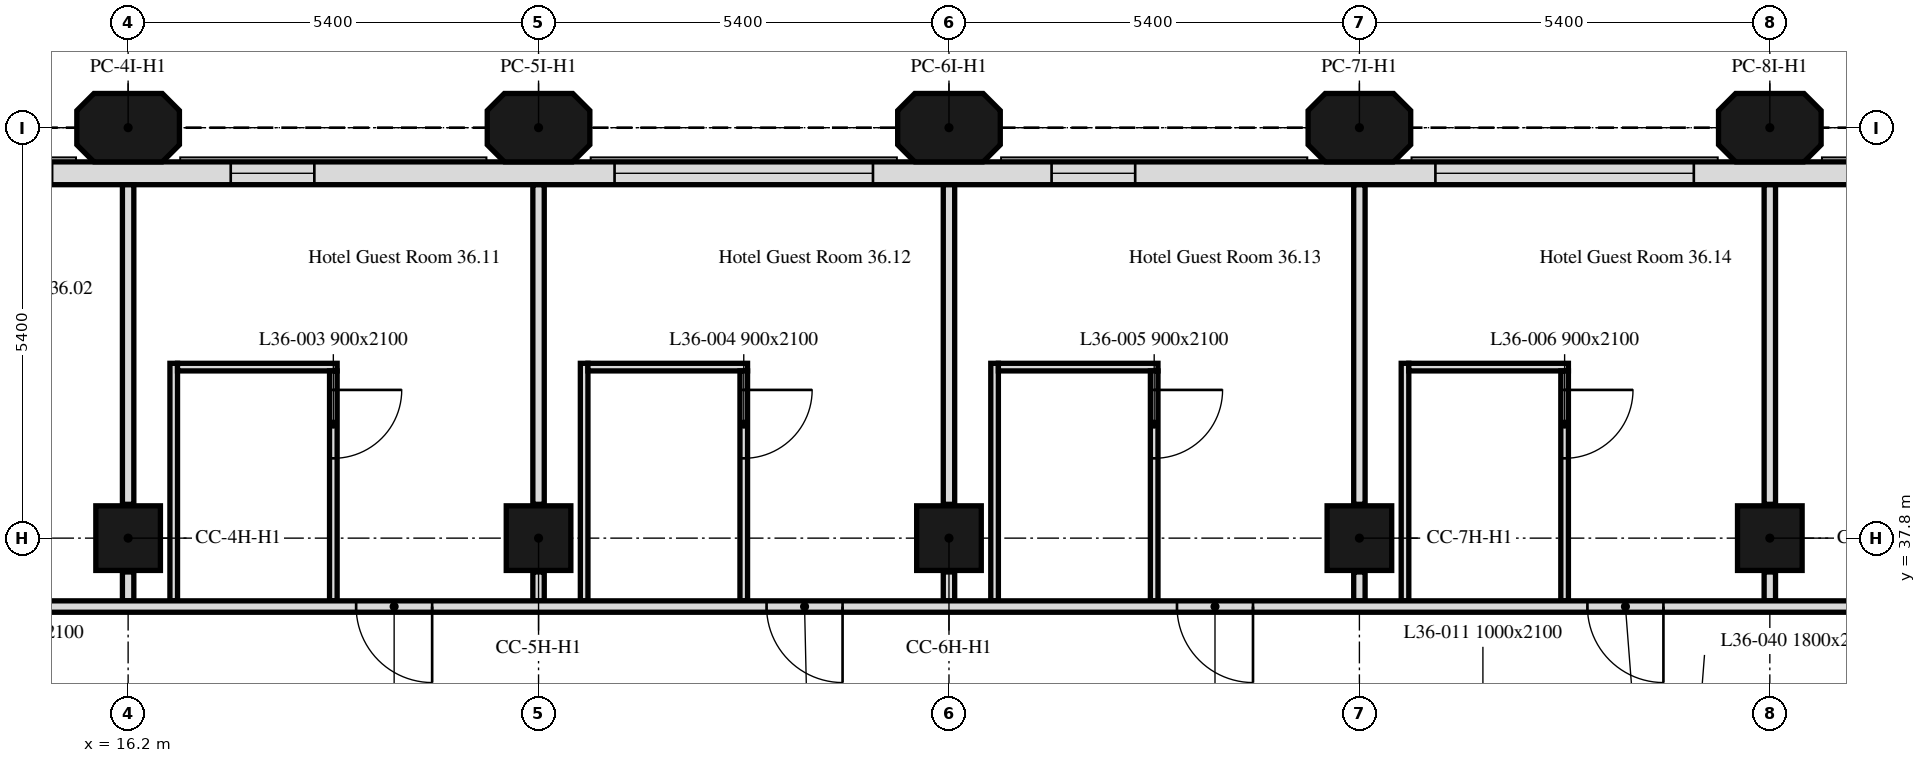
"""IFC4 building model, lengths in metres.
Left out: names, types, materials, properties, quantities, classifications, styles, units other than length and angle.
Written with IfcOpenShell. Run it as: python <this file> out.ifc"""

import sys

from ifc_helpers import new_model, si_unit, direction, frame, frame_2d, origin, origin_2d, place, context, subcontext, project, spatial, polyline, rectangle, outline, extrude, element, fill, save


model = new_model("IFC4")
c1 = context("Model", 3, precision=1e-05, world=origin(), true_north=direction((0.0, 1.0)))
c2 = subcontext(c1, "Body", "Model", "MODEL_VIEW")
j1 = project(units=[si_unit("LENGTHUNIT", "METRE"), si_unit("PLANEANGLEUNIT", "RADIAN")], contexts=[c1])
p1 = place(None, origin())
s1 = spatial("IfcSite", under=j1, at=p1, CompositionType="ELEMENT")
p2 = place(p1, origin())
s2 = spatial("IfcBuilding", under=s1, at=p2, CompositionType="ELEMENT")
p3 = place(p2, frame((0.0, 0.0, 156.1)))
s3 = spatial("IfcBuildingStorey", under=s2, at=p3, CompositionType="ELEMENT", Elevation=156.1)
for number, where, z_axis, x_axis in (
    (1, (16.2, 37.8, 0.0), (0.0, 0.0, 1.0), (1.0, 0.0, 0.0)),
    (2, (21.6, 37.8, 0.0), (0.0, 0.0, 1.0), (1.0, 0.0, 0.0)),
    (3, (27.0, 37.8, 0.0), (0.0, 0.0, 1.0), (1.0, 0.0, 0.0)),
    (4, (32.4, 37.8, 0.0), (0.0, 0.0, 1.0), (1.0, 0.0, 0.0)),
    (5, (37.8, 37.8, 0.0), (0.0, 0.0, 1.0), (1.0, 0.0, 0.0)),
):
    element("IfcColumn", number, at=place(p3, frame(where, z_axis=z_axis, x_axis=x_axis)), inside=s3, PredefinedType="COLUMN", context=c2, shape_type="SweptSolid", body=[
        extrude(rectangle(XDim=0.85, YDim=0.85, at=origin_2d()), origin(), (0.0, 0.0, 1.0), 3.0),
    ])
for number, where, z_axis, x_axis in (
    (6, (16.2, 43.2, 0.0), (0.0, 0.0, 1.0), (1.0, 0.0, 0.0)),
    (7, (21.6, 43.2, 0.0), (0.0, 0.0, 1.0), (1.0, 0.0, 0.0)),
    (8, (27.0, 43.2, 0.0), (0.0, 0.0, 1.0), (1.0, 0.0, 0.0)),
    (9, (32.4, 43.2, 0.0), (0.0, 0.0, 1.0), (1.0, 0.0, 0.0)),
    (10, (37.8, 43.2, 0.0), (0.0, 0.0, 1.0), (1.0, 0.0, 0.0)),
):
    element("IfcColumn", number, at=place(p3, frame(where, z_axis=z_axis, x_axis=x_axis)), inside=s3, PredefinedType="COLUMN", context=c2, shape_type="SweptSolid", body=[
        extrude(outline(polyline([(-0.45, -0.45), (0.45, -0.45), (0.675, -0.225), (0.675, 0.225), (0.45, 0.45), (-0.45, 0.45), (-0.675, 0.225), (-0.675, -0.225), (-0.45, -0.45)])), origin(), (0.0, 0.0, 1.0), 3.0),
    ])
p4 = place(p3, frame((43.014, 42.6, 0.0), z_axis=(0.0, 0.0, 1.0), x_axis=(-1.0, 0.0, 0.0)))
e11 = element("IfcWall", 11, at=p4, inside=s3, PredefinedType="SOLIDWALL", context=c2, shape_type="SweptSolid", body=[
    extrude(rectangle(XDim=32.027, YDim=0.3, at=frame_2d((16.014, 0.0))), origin(), (0.0, 0.0, 1.0), 3.0),
])
p5 = place(p4, frame((2.764, 0.0, 0.9)))
e12 = element("IfcOpeningElement", 12, at=p5, cuts=e11, PredefinedType="OPENING", context=c2, shape_type="SweptSolid", body=[
    extrude(rectangle(XDim=1.1, YDim=1.7, at=frame_2d((0.55, 0.85))), frame((0.0, 0.16, 0.0), z_axis=(0.0, -1.0, 0.0), x_axis=(1.0, 0.0, 0.0)), (0.0, 0.0, 1.0), 0.32),
])
p6 = place(p4, frame((6.214, 0.0, 0.9)))
e13 = element("IfcOpeningElement", 13, at=p6, cuts=e11, PredefinedType="OPENING", context=c2, shape_type="SweptSolid", body=[
    extrude(rectangle(XDim=3.4, YDim=1.7, at=frame_2d((1.7, 0.85))), frame((0.0, 0.16, 0.0), z_axis=(0.0, -1.0, 0.0), x_axis=(1.0, 0.0, 0.0)), (0.0, 0.0, 1.0), 0.32),
])
p7 = place(p4, frame((13.564, 0.0, 0.9)))
e14 = element("IfcOpeningElement", 14, at=p7, cuts=e11, PredefinedType="OPENING", context=c2, shape_type="SweptSolid", body=[
    extrude(rectangle(XDim=1.1, YDim=1.7, at=frame_2d((0.55, 0.85))), frame((0.0, 0.16, 0.0), z_axis=(0.0, -1.0, 0.0), x_axis=(1.0, 0.0, 0.0)), (0.0, 0.0, 1.0), 0.32),
])
p8 = place(p4, frame((17.014, 0.0, 0.9)))
e15 = element("IfcOpeningElement", 15, at=p8, cuts=e11, PredefinedType="OPENING", context=c2, shape_type="SweptSolid", body=[
    extrude(rectangle(XDim=3.4, YDim=1.7, at=frame_2d((1.7, 0.85))), frame((0.0, 0.16, 0.0), z_axis=(0.0, -1.0, 0.0), x_axis=(1.0, 0.0, 0.0)), (0.0, 0.0, 1.0), 0.32),
])
p9 = place(p4, frame((24.364, 0.0, 0.9)))
e16 = element("IfcOpeningElement", 16, at=p9, cuts=e11, PredefinedType="OPENING", context=c2, shape_type="SweptSolid", body=[
    extrude(rectangle(XDim=1.1, YDim=1.7, at=frame_2d((0.55, 0.85))), frame((0.0, 0.16, 0.0), z_axis=(0.0, -1.0, 0.0), x_axis=(1.0, 0.0, 0.0)), (0.0, 0.0, 1.0), 0.32),
])
p10 = place(p4, frame((27.814, 0.0, 0.9)))
e17 = element("IfcOpeningElement", 17, at=p10, cuts=e11, PredefinedType="OPENING", context=c2, shape_type="SweptSolid", body=[
    extrude(rectangle(XDim=3.4, YDim=1.7, at=frame_2d((1.7, 0.85))), frame((0.0, 0.16, 0.0), z_axis=(0.0, -1.0, 0.0), x_axis=(1.0, 0.0, 0.0)), (0.0, 0.0, 1.0), 0.32),
])
p11 = place(p3, frame((16.2, 36.975, 0.0), z_axis=(0.0, 0.0, 1.0), x_axis=(0.0, 1.0, 0.0)))
e18 = element("IfcWall", 18, at=p11, inside=s3, PredefinedType="PARTITIONING", context=c2, shape_type="SweptSolid", body=[
    extrude(rectangle(XDim=0.38, YDim=0.15, at=frame_2d((0.19, 0.0))), origin(), (0.0, 0.0, 1.0), 3.0),
])
p12 = place(p3, frame((16.2, 38.245, 0.0), z_axis=(0.0, 0.0, 1.0), x_axis=(0.0, 1.0, 0.0)))
e19 = element("IfcWall", 19, at=p12, inside=s3, PredefinedType="PARTITIONING", context=c2, shape_type="SweptSolid", body=[
    extrude(rectangle(XDim=4.204, YDim=0.15, at=frame_2d((2.102, 0.0))), origin(), (0.0, 0.0, 1.0), 3.0),
])
p13 = place(p3, frame((16.8, 36.975, 0.0), z_axis=(0.0, 0.0, 1.0), x_axis=(0.0, 1.0, 0.0)))
e20 = element("IfcWall", 20, at=p13, inside=s3, PredefinedType="PARTITIONING", context=c2, shape_type="SweptSolid", body=[
    extrude(rectangle(XDim=3.125, YDim=0.1, at=frame_2d((1.562, 0.0))), origin(), (0.0, 0.0, 1.0), 3.0),
])
p14 = place(p3, frame((16.85, 40.05, 0.0), z_axis=(0.0, 0.0, 1.0), x_axis=(1.0, 0.0, 0.0)))
e21 = element("IfcWall", 21, at=p14, inside=s3, PredefinedType="PARTITIONING", context=c2, shape_type="SweptSolid", body=[
    extrude(rectangle(XDim=2.1, YDim=0.1, at=frame_2d((1.05, 0.0))), origin(), (0.0, 0.0, 1.0), 3.0),
])
p15 = place(p3, frame((18.9, 40.0, 0.0), z_axis=(0.0, 0.0, 1.0), x_axis=(0.0, -1.0, 0.0)))
e22 = element("IfcWall", 22, at=p15, inside=s3, PredefinedType="PARTITIONING", context=c2, shape_type="SweptSolid", body=[
    extrude(rectangle(XDim=3.025, YDim=0.1, at=frame_2d((1.512, 0.0))), origin(), (0.0, 0.0, 1.0), 3.0),
])
p16 = place(p15, frame((0.25, 0.0, 0.0)))
e23 = element("IfcOpeningElement", 23, at=p16, cuts=e22, PredefinedType="OPENING", context=c2, shape_type="SweptSolid", body=[
    extrude(rectangle(XDim=0.9, YDim=2.1, at=frame_2d((0.45, 1.05))), frame((0.0, 0.05, 0.0), z_axis=(0.0, -1.0, 0.0), x_axis=(1.0, 0.0, 0.0)), (0.0, 0.0, 1.0), 0.1),
])
p17 = place(p3, frame((21.6, 36.975, 0.0), z_axis=(0.0, 0.0, 1.0), x_axis=(0.0, 1.0, 0.0)))
e24 = element("IfcWall", 24, at=p17, inside=s3, PredefinedType="PARTITIONING", context=c2, shape_type="SweptSolid", body=[
    extrude(rectangle(XDim=0.38, YDim=0.15, at=frame_2d((0.19, 0.0))), origin(), (0.0, 0.0, 1.0), 3.0),
])
p18 = place(p3, frame((21.6, 38.245, 0.0), z_axis=(0.0, 0.0, 1.0), x_axis=(0.0, 1.0, 0.0)))
e25 = element("IfcWall", 25, at=p18, inside=s3, PredefinedType="PARTITIONING", context=c2, shape_type="SweptSolid", body=[
    extrude(rectangle(XDim=4.204, YDim=0.15, at=frame_2d((2.102, 0.0))), origin(), (0.0, 0.0, 1.0), 3.0),
])
p19 = place(p3, frame((22.2, 36.975, 0.0), z_axis=(0.0, 0.0, 1.0), x_axis=(0.0, 1.0, 0.0)))
e26 = element("IfcWall", 26, at=p19, inside=s3, PredefinedType="PARTITIONING", context=c2, shape_type="SweptSolid", body=[
    extrude(rectangle(XDim=3.125, YDim=0.1, at=frame_2d((1.562, 0.0))), origin(), (0.0, 0.0, 1.0), 3.0),
])
p20 = place(p3, frame((22.25, 40.05, 0.0), z_axis=(0.0, 0.0, 1.0), x_axis=(1.0, 0.0, 0.0)))
e27 = element("IfcWall", 27, at=p20, inside=s3, PredefinedType="PARTITIONING", context=c2, shape_type="SweptSolid", body=[
    extrude(rectangle(XDim=2.1, YDim=0.1, at=frame_2d((1.05, 0.0))), origin(), (0.0, 0.0, 1.0), 3.0),
])
p21 = place(p3, frame((24.3, 40.0, 0.0), z_axis=(0.0, 0.0, 1.0), x_axis=(0.0, -1.0, 0.0)))
e28 = element("IfcWall", 28, at=p21, inside=s3, PredefinedType="PARTITIONING", context=c2, shape_type="SweptSolid", body=[
    extrude(rectangle(XDim=3.025, YDim=0.1, at=frame_2d((1.512, 0.0))), origin(), (0.0, 0.0, 1.0), 3.0),
])
p22 = place(p21, frame((0.25, 0.0, 0.0)))
e29 = element("IfcOpeningElement", 29, at=p22, cuts=e28, PredefinedType="OPENING", context=c2, shape_type="SweptSolid", body=[
    extrude(rectangle(XDim=0.9, YDim=2.1, at=frame_2d((0.45, 1.05))), frame((0.0, 0.05, 0.0), z_axis=(0.0, -1.0, 0.0), x_axis=(1.0, 0.0, 0.0)), (0.0, 0.0, 1.0), 0.1),
])
p23 = place(p3, frame((27.0, 36.975, 0.0), z_axis=(0.0, 0.0, 1.0), x_axis=(0.0, 1.0, 0.0)))
e30 = element("IfcWall", 30, at=p23, inside=s3, PredefinedType="PARTITIONING", context=c2, shape_type="SweptSolid", body=[
    extrude(rectangle(XDim=0.38, YDim=0.15, at=frame_2d((0.19, 0.0))), origin(), (0.0, 0.0, 1.0), 3.0),
])
p24 = place(p3, frame((27.0, 38.245, 0.0), z_axis=(0.0, 0.0, 1.0), x_axis=(0.0, 1.0, 0.0)))
e31 = element("IfcWall", 31, at=p24, inside=s3, PredefinedType="PARTITIONING", context=c2, shape_type="SweptSolid", body=[
    extrude(rectangle(XDim=4.204, YDim=0.15, at=frame_2d((2.102, 0.0))), origin(), (0.0, 0.0, 1.0), 3.0),
])
p25 = place(p3, frame((27.6, 36.975, 0.0), z_axis=(0.0, 0.0, 1.0), x_axis=(0.0, 1.0, 0.0)))
e32 = element("IfcWall", 32, at=p25, inside=s3, PredefinedType="PARTITIONING", context=c2, shape_type="SweptSolid", body=[
    extrude(rectangle(XDim=3.125, YDim=0.1, at=frame_2d((1.562, 0.0))), origin(), (0.0, 0.0, 1.0), 3.0),
])
p26 = place(p3, frame((27.65, 40.05, 0.0), z_axis=(0.0, 0.0, 1.0), x_axis=(1.0, 0.0, 0.0)))
e33 = element("IfcWall", 33, at=p26, inside=s3, PredefinedType="PARTITIONING", context=c2, shape_type="SweptSolid", body=[
    extrude(rectangle(XDim=2.1, YDim=0.1, at=frame_2d((1.05, 0.0))), origin(), (0.0, 0.0, 1.0), 3.0),
])
p27 = place(p3, frame((29.7, 40.0, 0.0), z_axis=(0.0, 0.0, 1.0), x_axis=(0.0, -1.0, 0.0)))
e34 = element("IfcWall", 34, at=p27, inside=s3, PredefinedType="PARTITIONING", context=c2, shape_type="SweptSolid", body=[
    extrude(rectangle(XDim=3.025, YDim=0.1, at=frame_2d((1.512, 0.0))), origin(), (0.0, 0.0, 1.0), 3.0),
])
p28 = place(p27, frame((0.25, 0.0, 0.0)))
e35 = element("IfcOpeningElement", 35, at=p28, cuts=e34, PredefinedType="OPENING", context=c2, shape_type="SweptSolid", body=[
    extrude(rectangle(XDim=0.9, YDim=2.1, at=frame_2d((0.45, 1.05))), frame((0.0, 0.05, 0.0), z_axis=(0.0, -1.0, 0.0), x_axis=(1.0, 0.0, 0.0)), (0.0, 0.0, 1.0), 0.1),
])
p29 = place(p3, frame((32.4, 36.975, 0.0), z_axis=(0.0, 0.0, 1.0), x_axis=(0.0, 1.0, 0.0)))
e36 = element("IfcWall", 36, at=p29, inside=s3, PredefinedType="PARTITIONING", context=c2, shape_type="SweptSolid", body=[
    extrude(rectangle(XDim=0.38, YDim=0.15, at=frame_2d((0.19, 0.0))), origin(), (0.0, 0.0, 1.0), 3.0),
])
p30 = place(p3, frame((32.4, 38.245, 0.0), z_axis=(0.0, 0.0, 1.0), x_axis=(0.0, 1.0, 0.0)))
e37 = element("IfcWall", 37, at=p30, inside=s3, PredefinedType="PARTITIONING", context=c2, shape_type="SweptSolid", body=[
    extrude(rectangle(XDim=4.204, YDim=0.15, at=frame_2d((2.102, 0.0))), origin(), (0.0, 0.0, 1.0), 3.0),
])
p31 = place(p3, frame((33.0, 36.975, 0.0), z_axis=(0.0, 0.0, 1.0), x_axis=(0.0, 1.0, 0.0)))
e38 = element("IfcWall", 38, at=p31, inside=s3, PredefinedType="PARTITIONING", context=c2, shape_type="SweptSolid", body=[
    extrude(rectangle(XDim=3.125, YDim=0.1, at=frame_2d((1.562, 0.0))), origin(), (0.0, 0.0, 1.0), 3.0),
])
p32 = place(p3, frame((33.05, 40.05, 0.0), z_axis=(0.0, 0.0, 1.0), x_axis=(1.0, 0.0, 0.0)))
e39 = element("IfcWall", 39, at=p32, inside=s3, PredefinedType="PARTITIONING", context=c2, shape_type="SweptSolid", body=[
    extrude(rectangle(XDim=2.1, YDim=0.1, at=frame_2d((1.05, 0.0))), origin(), (0.0, 0.0, 1.0), 3.0),
])
p33 = place(p3, frame((35.1, 40.0, 0.0), z_axis=(0.0, 0.0, 1.0), x_axis=(0.0, -1.0, 0.0)))
e40 = element("IfcWall", 40, at=p33, inside=s3, PredefinedType="PARTITIONING", context=c2, shape_type="SweptSolid", body=[
    extrude(rectangle(XDim=3.025, YDim=0.1, at=frame_2d((1.512, 0.0))), origin(), (0.0, 0.0, 1.0), 3.0),
])
p34 = place(p33, frame((0.25, 0.0, 0.0)))
e41 = element("IfcOpeningElement", 41, at=p34, cuts=e40, PredefinedType="OPENING", context=c2, shape_type="SweptSolid", body=[
    extrude(rectangle(XDim=0.9, YDim=2.1, at=frame_2d((0.45, 1.05))), frame((0.0, 0.05, 0.0), z_axis=(0.0, -1.0, 0.0), x_axis=(1.0, 0.0, 0.0)), (0.0, 0.0, 1.0), 0.1),
])
p35 = place(p3, frame((37.8, 36.975, 0.0), z_axis=(0.0, 0.0, 1.0), x_axis=(0.0, 1.0, 0.0)))
e42 = element("IfcWall", 42, at=p35, inside=s3, PredefinedType="PARTITIONING", context=c2, shape_type="SweptSolid", body=[
    extrude(rectangle(XDim=0.38, YDim=0.15, at=frame_2d((0.19, 0.0))), origin(), (0.0, 0.0, 1.0), 3.0),
])
p36 = place(p3, frame((37.8, 38.245, 0.0), z_axis=(0.0, 0.0, 1.0), x_axis=(0.0, 1.0, 0.0)))
e43 = element("IfcWall", 43, at=p36, inside=s3, PredefinedType="PARTITIONING", context=c2, shape_type="SweptSolid", body=[
    extrude(rectangle(XDim=4.204, YDim=0.15, at=frame_2d((2.102, 0.0))), origin(), (0.0, 0.0, 1.0), 3.0),
])
p37 = place(p3, frame((47.849, 36.9, 0.0), z_axis=(0.0, 0.0, 1.0), x_axis=(-1.0, 0.0, 0.0)))
e44 = element("IfcWall", 44, at=p37, inside=s3, PredefinedType="PARTITIONING", context=c2, shape_type="SweptSolid", body=[
    extrude(rectangle(XDim=41.698, YDim=0.15, at=frame_2d((20.849, 0.0))), origin(), (0.0, 0.0, 1.0), 3.0),
])
p38 = place(p37, frame((39.249, 0.0, 0.0)))
e45 = element("IfcOpeningElement", 45, at=p38, cuts=e44, PredefinedType="OPENING", context=c2, shape_type="SweptSolid", body=[
    extrude(rectangle(XDim=1.0, YDim=2.1, at=frame_2d((0.5, 1.05))), frame((0.0, 0.075, 0.0), z_axis=(0.0, -1.0, 0.0), x_axis=(1.0, 0.0, 0.0)), (0.0, 0.0, 1.0), 0.15),
])
p39 = place(p37, frame((27.649, 0.0, 0.0)))
e46 = element("IfcOpeningElement", 46, at=p39, cuts=e44, PredefinedType="OPENING", context=c2, shape_type="SweptSolid", body=[
    extrude(rectangle(XDim=1.0, YDim=2.1, at=frame_2d((0.5, 1.05))), frame((0.0, 0.075, 0.0), z_axis=(0.0, -1.0, 0.0), x_axis=(1.0, 0.0, 0.0)), (0.0, 0.0, 1.0), 0.15),
])
p40 = place(p37, frame((22.249, 0.0, 0.0)))
e47 = element("IfcOpeningElement", 47, at=p40, cuts=e44, PredefinedType="OPENING", context=c2, shape_type="SweptSolid", body=[
    extrude(rectangle(XDim=1.0, YDim=2.1, at=frame_2d((0.5, 1.05))), frame((0.0, 0.075, 0.0), z_axis=(0.0, -1.0, 0.0), x_axis=(1.0, 0.0, 0.0)), (0.0, 0.0, 1.0), 0.15),
])
p41 = place(p37, frame((16.849, 0.0, 0.0)))
e48 = element("IfcOpeningElement", 48, at=p41, cuts=e44, PredefinedType="OPENING", context=c2, shape_type="SweptSolid", body=[
    extrude(rectangle(XDim=1.0, YDim=2.1, at=frame_2d((0.5, 1.05))), frame((0.0, 0.075, 0.0), z_axis=(0.0, -1.0, 0.0), x_axis=(1.0, 0.0, 0.0)), (0.0, 0.0, 1.0), 0.15),
])
p42 = place(p37, frame((11.449, 0.0, 0.0)))
e49 = element("IfcOpeningElement", 49, at=p42, cuts=e44, PredefinedType="OPENING", context=c2, shape_type="SweptSolid", body=[
    extrude(rectangle(XDim=1.0, YDim=2.1, at=frame_2d((0.5, 1.05))), frame((0.0, 0.075, 0.0), z_axis=(0.0, -1.0, 0.0), x_axis=(1.0, 0.0, 0.0)), (0.0, 0.0, 1.0), 0.15),
])
p43 = place(p37, frame((2.744, 0.0, 0.0)))
e50 = element("IfcOpeningElement", 50, at=p43, cuts=e44, PredefinedType="OPENING", context=c2, shape_type="SweptSolid", body=[
    extrude(rectangle(XDim=1.0, YDim=2.1, at=frame_2d((0.5, 1.05))), frame((0.0, 0.075, 0.0), z_axis=(0.0, -1.0, 0.0), x_axis=(1.0, 0.0, 0.0)), (0.0, 0.0, 1.0), 0.15),
])
p44 = place(p6, origin())
e51 = element("IfcWindow", 51, at=p44, inside=s3, PartitioningType="SINGLE_PANEL", PredefinedType="WINDOW", context=c2, shape_type="SweptSolid", body=[
    extrude(rectangle(XDim=3.4, YDim=1.7, at=frame_2d((1.7, 0.85))), frame((0.0, 0.03, 0.0), z_axis=(0.0, -1.0, 0.0), x_axis=(1.0, 0.0, 0.0)), (0.0, 0.0, 1.0), 0.06),
])
fill(e13, e51)
p45 = place(p7, origin())
e52 = element("IfcWindow", 52, at=p45, inside=s3, PartitioningType="SINGLE_PANEL", PredefinedType="WINDOW", context=c2, shape_type="SweptSolid", body=[
    extrude(rectangle(XDim=1.1, YDim=1.7, at=frame_2d((0.55, 0.85))), frame((0.0, 0.03, 0.0), z_axis=(0.0, -1.0, 0.0), x_axis=(1.0, 0.0, 0.0)), (0.0, 0.0, 1.0), 0.06),
])
fill(e14, e52)
p46 = place(p8, origin())
e53 = element("IfcWindow", 53, at=p46, inside=s3, PartitioningType="SINGLE_PANEL", PredefinedType="WINDOW", context=c2, shape_type="SweptSolid", body=[
    extrude(rectangle(XDim=3.4, YDim=1.7, at=frame_2d((1.7, 0.85))), frame((0.0, 0.03, 0.0), z_axis=(0.0, -1.0, 0.0), x_axis=(1.0, 0.0, 0.0)), (0.0, 0.0, 1.0), 0.06),
])
fill(e15, e53)
p47 = place(p9, origin())
e54 = element("IfcWindow", 54, at=p47, inside=s3, PartitioningType="SINGLE_PANEL", PredefinedType="WINDOW", context=c2, shape_type="SweptSolid", body=[
    extrude(rectangle(XDim=1.1, YDim=1.7, at=frame_2d((0.55, 0.85))), frame((0.0, 0.03, 0.0), z_axis=(0.0, -1.0, 0.0), x_axis=(1.0, 0.0, 0.0)), (0.0, 0.0, 1.0), 0.06),
])
fill(e16, e54)
p48 = place(p16, origin())
e55 = element("IfcDoor", 55, at=p48, inside=s3, OperationType="SINGLE_SWING_RIGHT", PredefinedType="DOOR", context=c2, shape_type="SweptSolid", body=[
    extrude(rectangle(XDim=0.9, YDim=2.1, at=frame_2d((0.45, 1.05))), frame((0.0, 0.025, 0.0), z_axis=(0.0, -1.0, 0.0), x_axis=(1.0, 0.0, 0.0)), (0.0, 0.0, 1.0), 0.05),
])
fill(e23, e55)
p49 = place(p22, origin())
e56 = element("IfcDoor", 56, at=p49, inside=s3, OperationType="SINGLE_SWING_LEFT", PredefinedType="DOOR", context=c2, shape_type="SweptSolid", body=[
    extrude(rectangle(XDim=0.9, YDim=2.1, at=frame_2d((0.45, 1.05))), frame((0.0, 0.025, 0.0), z_axis=(0.0, -1.0, 0.0), x_axis=(1.0, 0.0, 0.0)), (0.0, 0.0, 1.0), 0.05),
])
fill(e29, e56)
p50 = place(p28, origin())
e57 = element("IfcDoor", 57, at=p50, inside=s3, OperationType="SINGLE_SWING_LEFT", PredefinedType="DOOR", context=c2, shape_type="SweptSolid", body=[
    extrude(rectangle(XDim=0.9, YDim=2.1, at=frame_2d((0.45, 1.05))), frame((0.0, 0.025, 0.0), z_axis=(0.0, -1.0, 0.0), x_axis=(1.0, 0.0, 0.0)), (0.0, 0.0, 1.0), 0.05),
])
fill(e35, e57)
p51 = place(p34, origin())
e58 = element("IfcDoor", 58, at=p51, inside=s3, OperationType="SINGLE_SWING_RIGHT", PredefinedType="DOOR", context=c2, shape_type="SweptSolid", body=[
    extrude(rectangle(XDim=0.9, YDim=2.1, at=frame_2d((0.45, 1.05))), frame((0.0, 0.025, 0.0), z_axis=(0.0, -1.0, 0.0), x_axis=(1.0, 0.0, 0.0)), (0.0, 0.0, 1.0), 0.05),
])
fill(e41, e58)
p52 = place(p39, origin())
e59 = element("IfcDoor", 59, at=p52, inside=s3, OperationType="SINGLE_SWING_LEFT", PredefinedType="DOOR", context=c2, shape_type="SweptSolid", body=[
    extrude(rectangle(XDim=1.0, YDim=2.1, at=frame_2d((0.5, 1.05))), frame((0.0, 0.025, 0.0), z_axis=(0.0, -1.0, 0.0), x_axis=(1.0, 0.0, 0.0)), (0.0, 0.0, 1.0), 0.05),
])
fill(e46, e59)
p53 = place(p40, origin())
e60 = element("IfcDoor", 60, at=p53, inside=s3, OperationType="SINGLE_SWING_LEFT", PredefinedType="DOOR", context=c2, shape_type="SweptSolid", body=[
    extrude(rectangle(XDim=1.0, YDim=2.1, at=frame_2d((0.5, 1.05))), frame((0.0, 0.025, 0.0), z_axis=(0.0, -1.0, 0.0), x_axis=(1.0, 0.0, 0.0)), (0.0, 0.0, 1.0), 0.05),
])
fill(e47, e60)
p54 = place(p41, origin())
e61 = element("IfcDoor", 61, at=p54, inside=s3, OperationType="SINGLE_SWING_RIGHT", PredefinedType="DOOR", context=c2, shape_type="SweptSolid", body=[
    extrude(rectangle(XDim=1.0, YDim=2.1, at=frame_2d((0.5, 1.05))), frame((0.0, 0.025, 0.0), z_axis=(0.0, -1.0, 0.0), x_axis=(1.0, 0.0, 0.0)), (0.0, 0.0, 1.0), 0.05),
])
fill(e48, e61)
p55 = place(p42, origin())
e62 = element("IfcDoor", 62, at=p55, inside=s3, OperationType="SINGLE_SWING_RIGHT", PredefinedType="DOOR", context=c2, shape_type="SweptSolid", body=[
    extrude(rectangle(XDim=1.0, YDim=2.1, at=frame_2d((0.5, 1.05))), frame((0.0, 0.025, 0.0), z_axis=(0.0, -1.0, 0.0), x_axis=(1.0, 0.0, 0.0)), (0.0, 0.0, 1.0), 0.05),
])
fill(e49, e62)
save(model, sys.argv[1])
